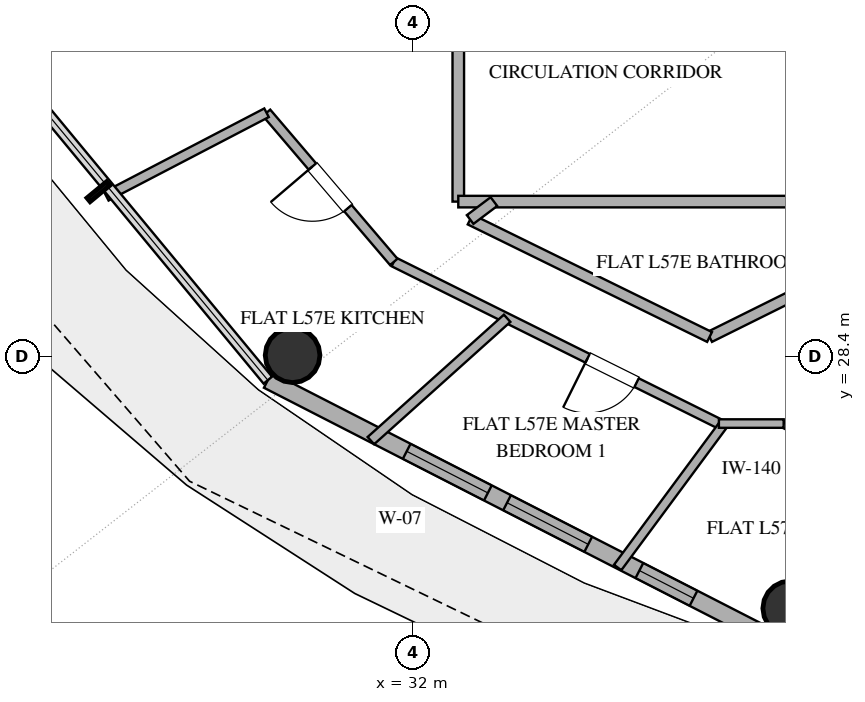
"""IFC4 building model, lengths in metres.
Left out: names, types, materials, properties, quantities, classifications, styles, units other than length and angle.
Written with IfcOpenShell. Run it as: python <this file> out.ifc"""

import sys

from ifc_helpers import new_model, si_unit, direction, frame, frame_2d, origin, origin_2d, place, context, subcontext, project, spatial, rectangle, hollow_circle, extrude, element, fill, save


model = new_model("IFC4")
c1 = context("Model", 3, precision=1e-05, world=origin(), true_north=direction((0.0, 1.0)))
c2 = subcontext(c1, "Body", "Model", "MODEL_VIEW")
j1 = project(units=[si_unit("LENGTHUNIT", "METRE"), si_unit("PLANEANGLEUNIT", "RADIAN")], contexts=[c1])
p1 = place(None, origin())
s1 = spatial("IfcSite", under=j1, at=p1, CompositionType="ELEMENT")
p2 = place(p1, origin())
s2 = spatial("IfcBuilding", under=s1, at=p2, CompositionType="ELEMENT")
p3 = place(p2, frame((0.0, 0.0, 224.4)))
s3 = spatial("IfcBuildingStorey", under=s2, at=p3, CompositionType="ELEMENT", Elevation=224.4)
for number, where, z_axis, x_axis in (
    (1, (30.025, 28.424, 0.0), (0.0, 0.0, 1.0), (1.0, 0.0, 0.0)),
    (2, (38.209, 24.261, 0.0), (0.0, 0.0, 1.0), (1.0, 0.0, 0.0)),
):
    element("IfcColumn", number, at=place(p3, frame(where, z_axis=z_axis, x_axis=x_axis)), inside=s3, PredefinedType="COLUMN", context=c2, shape_type="SweptSolid", body=[
        extrude(hollow_circle(Radius=0.45, WallThickness=0.025, at=origin_2d()), origin(), (0.0, 0.0, 1.0), 3.36),
    ])
p4 = place(p3, frame((29.617, 28.013, 0.0), z_axis=(0.0, 0.0, 1.0), x_axis=(0.890007394051, -0.455946091699, 0.0)))
e3 = element("IfcWall", 3, at=p4, inside=s3, PredefinedType="SOLIDWALL", context=c2, shape_type="SweptSolid", body=[
    extrude(rectangle(XDim=9.404, YDim=0.28, at=frame_2d((4.702, 0.0))), origin(), (0.0, 0.0, 1.0), 3.36),
])
p5 = place(p4, frame((2.566, 0.0, 0.85)))
e4 = element("IfcOpeningElement", 4, at=p5, cuts=e3, PredefinedType="OPENING", context=c2, shape_type="SweptSolid", body=[
    extrude(rectangle(XDim=1.5, YDim=1.8, at=frame_2d((0.75, 0.9))), frame((0.0, 0.15, 0.0), z_axis=(0.0, -1.0, 0.0), x_axis=(1.0, 0.0, 0.0)), (0.0, 0.0, 1.0), 0.3),
])
p6 = place(p4, frame((4.421, 0.0, 0.85)))
e5 = element("IfcOpeningElement", 5, at=p6, cuts=e3, PredefinedType="OPENING", context=c2, shape_type="SweptSolid", body=[
    extrude(rectangle(XDim=1.5, YDim=1.8, at=frame_2d((0.75, 0.9))), frame((0.0, 0.15, 0.0), z_axis=(0.0, -1.0, 0.0), x_axis=(1.0, 0.0, 0.0)), (0.0, 0.0, 1.0), 0.3),
])
p7 = place(p4, frame((6.866, 0.0, 0.85)))
e6 = element("IfcOpeningElement", 6, at=p7, cuts=e3, PredefinedType="OPENING", context=c2, shape_type="SweptSolid", body=[
    extrude(rectangle(XDim=1.0, YDim=1.8, at=frame_2d((0.5, 0.9))), frame((0.0, 0.15, 0.0), z_axis=(0.0, -1.0, 0.0), x_axis=(1.0, 0.0, 0.0)), (0.0, 0.0, 1.0), 0.3),
])
p8 = place(p3, frame((32.75, 30.95, 0.0), z_axis=(0.0, 0.0, 1.0), x_axis=(0.0, 1.0, 0.0)))
e7 = element("IfcWall", 7, at=p8, inside=s3, PredefinedType="PARTITIONING", context=c2, shape_type="SweptSolid", body=[
    extrude(rectangle(XDim=12.471, YDim=0.19, at=frame_2d((6.236, 0.0))), origin(), (0.0, 0.0, 1.0), 2.72),
])
p9 = place(p8, frame((4.508, 0.0, 0.0)))
e8 = element("IfcOpeningElement", 8, at=p9, cuts=e7, PredefinedType="OPENING", context=c2, shape_type="SweptSolid", body=[
    extrude(rectangle(XDim=1.0, YDim=2.2, at=frame_2d((0.5, 1.1))), frame((0.0, 0.105, 0.0), z_axis=(0.0, -1.0, 0.0), x_axis=(1.0, 0.0, 0.0)), (0.0, 0.0, 1.0), 0.21),
])
p10 = place(p3, frame((45.87, 30.95, 0.0), z_axis=(0.0, 0.0, 1.0), x_axis=(-1.0, 0.0, 0.0)))
e9 = element("IfcWall", 9, at=p10, inside=s3, PredefinedType="PARTITIONING", context=c2, shape_type="SweptSolid", body=[
    extrude(rectangle(XDim=13.12, YDim=0.19, at=frame_2d((6.56, 0.0))), origin(), (0.0, 0.0, 1.0), 2.72),
])
p11 = place(p3, frame((41.366, 30.95, 0.0), z_axis=(0.0, 0.0, 1.0), x_axis=(-0.895701232799, -0.444656385946, 0.0)))
e10 = element("IfcWall", 10, at=p11, inside=s3, PredefinedType="PLUMBINGWALL", context=c2, shape_type="SweptSolid", body=[
    extrude(rectangle(XDim=5.006, YDim=0.18, at=frame_2d((2.503, 0.0))), origin(), (0.0, 0.0, 1.0), 2.72),
])
p12 = place(p11, frame((2.078, 0.0, 0.0)))
e11 = element("IfcOpeningElement", 11, at=p12, cuts=e10, PredefinedType="OPENING", context=c2, shape_type="SweptSolid", body=[
    extrude(rectangle(XDim=0.85, YDim=2.1, at=frame_2d((0.425, 1.05))), frame((0.0, 0.1, 0.0), z_axis=(0.0, -1.0, 0.0), x_axis=(1.0, 0.0, 0.0)), (0.0, 0.0, 1.0), 0.2),
])
p13 = place(p3, frame((36.882, 28.724, 0.0), z_axis=(0.0, 0.0, 1.0), x_axis=(-0.897797301304, 0.440408907461, 0.0)))
e12 = element("IfcWall", 12, at=p13, inside=s3, PredefinedType="PLUMBINGWALL", context=c2, shape_type="SweptSolid", body=[
    extrude(rectangle(XDim=4.385, YDim=0.18, at=frame_2d((2.193, 0.0))), origin(), (0.0, 0.0, 1.0), 2.72),
])
p14 = place(p3, frame((37.036, 27.3, 0.0), z_axis=(0.0, 0.0, 1.0), x_axis=(-0.895471406875, 0.445119039661, 0.0)))
e13 = element("IfcWall", 13, at=p14, inside=s3, PredefinedType="PLUMBINGWALL", context=c2, shape_type="SweptSolid", body=[
    extrude(rectangle(XDim=5.971, YDim=0.16, at=frame_2d((2.986, 0.0))), origin(), (0.0, 0.0, 1.0), 2.72),
])
p15 = place(p14, frame((1.512, 0.0, 0.0)))
e14 = element("IfcOpeningElement", 14, at=p15, cuts=e13, PredefinedType="OPENING", context=c2, shape_type="SweptSolid", body=[
    extrude(rectangle(XDim=0.9, YDim=2.1, at=frame_2d((0.45, 1.05))), frame((0.0, 0.09, 0.0), z_axis=(0.0, -1.0, 0.0), x_axis=(1.0, 0.0, 0.0)), (0.0, 0.0, 1.0), 0.18),
])
p16 = place(p3, frame((31.689, 29.958, 0.0), z_axis=(0.0, 0.0, 1.0), x_axis=(-0.649012353166, 0.760777868657, 0.0)))
e15 = element("IfcWall", 15, at=p16, inside=s3, PredefinedType="PLUMBINGWALL", context=c2, shape_type="SweptSolid", body=[
    extrude(rectangle(XDim=3.224, YDim=0.16, at=frame_2d((1.612, 0.0))), origin(), (0.0, 0.0, 1.0), 2.72),
])
p17 = place(p16, frame((1.162, 0.0, 0.0)))
e16 = element("IfcOpeningElement", 16, at=p17, cuts=e15, PredefinedType="OPENING", context=c2, shape_type="SweptSolid", body=[
    extrude(rectangle(XDim=0.9, YDim=2.1, at=frame_2d((0.45, 1.05))), frame((0.0, 0.09, 0.0), z_axis=(0.0, -1.0, 0.0), x_axis=(1.0, 0.0, 0.0)), (0.0, 0.0, 1.0), 0.18),
])
p18 = place(p3, frame((31.312, 27.019, 0.0), z_axis=(0.0, 0.0, 1.0), x_axis=(0.744144111532, 0.668019117445, 0.0)))
e17 = element("IfcWall", 17, at=p18, inside=s3, PredefinedType="PLUMBINGWALL", context=c2, shape_type="SweptSolid", body=[
    extrude(rectangle(XDim=3.011, YDim=0.16, at=frame_2d((1.506, 0.0))), origin(), (0.0, 0.0, 1.0), 2.72),
])
p19 = place(p3, frame((29.596, 32.411, 0.0), z_axis=(0.0, 0.0, 1.0), x_axis=(-0.886874801181, -0.462009834344, 0.0)))
e18 = element("IfcWall", 18, at=p19, inside=s3, PredefinedType="PLUMBINGWALL", context=c2, shape_type="SweptSolid", body=[
    extrude(rectangle(XDim=2.971, YDim=0.16, at=frame_2d((1.485, 0.0))), origin(), (0.0, 0.0, 1.0), 2.72),
])
p20 = place(p3, frame((35.371, 24.933, 0.0), z_axis=(0.0, 0.0, 1.0), x_axis=(0.594787288624, 0.803883126637, 0.0)))
e19 = element("IfcWall", 19, at=p20, inside=s3, PredefinedType="PARTITIONING", context=c2, shape_type="SweptSolid", body=[
    extrude(rectangle(XDim=2.945, YDim=0.15, at=frame_2d((1.472, 0.0))), origin(), (0.0, 0.0, 1.0), 2.72),
])
p21 = place(p3, frame((39.345, 26.682, 0.0), z_axis=(0.0, 0.0, 1.0), x_axis=(-0.895584310315, 0.444891833053, 0.0)))
e20 = element("IfcWall", 20, at=p21, inside=s3, PredefinedType="PARTITIONING", context=c2, shape_type="SweptSolid", body=[
    extrude(rectangle(XDim=1.389, YDim=0.14, at=frame_2d((0.694, 0.0))), origin(), (0.0, 0.0, 1.0), 2.72),
])
p22 = place(p3, frame((38.101, 27.3, 0.0), z_axis=(0.0, 0.0, 1.0), x_axis=(-1.0, 0.0, 0.0)))
e21 = element("IfcWall", 21, at=p22, inside=s3, PredefinedType="PARTITIONING", context=c2, shape_type="SweptSolid", body=[
    extrude(rectangle(XDim=1.065, YDim=0.14, at=frame_2d((0.533, 0.0))), origin(), (0.0, 0.0, 1.0), 2.72),
])
p23 = place(p3, frame((32.945, 30.655, 0.0), z_axis=(0.0, 0.0, 1.0), x_axis=(0.798681895285, 0.601753462927, 0.0)))
e22 = element("IfcWall", 22, at=p23, inside=s3, PredefinedType="PLUMBINGWALL", context=c2, shape_type="SweptSolid", body=[
    extrude(rectangle(XDim=0.49, YDim=0.18, at=frame_2d((0.245, 0.0))), origin(), (0.0, 0.0, 1.0), 2.72),
])
p24 = place(p5, origin())
e23 = element("IfcWindow", 23, at=p24, inside=s3, PartitioningType="SINGLE_PANEL", PredefinedType="WINDOW", context=c2, shape_type="SweptSolid", body=[
    extrude(rectangle(XDim=1.5, YDim=1.8, at=frame_2d((0.75, 0.9))), frame((0.0, 0.03, 0.0), z_axis=(0.0, -1.0, 0.0), x_axis=(1.0, 0.0, 0.0)), (0.0, 0.0, 1.0), 0.06),
])
fill(e4, e23)
p25 = place(p6, origin())
e24 = element("IfcWindow", 24, at=p25, inside=s3, PartitioningType="SINGLE_PANEL", PredefinedType="WINDOW", context=c2, shape_type="SweptSolid", body=[
    extrude(rectangle(XDim=1.5, YDim=1.8, at=frame_2d((0.75, 0.9))), frame((0.0, 0.03, 0.0), z_axis=(0.0, -1.0, 0.0), x_axis=(1.0, 0.0, 0.0)), (0.0, 0.0, 1.0), 0.06),
])
fill(e5, e24)
p26 = place(p7, origin())
e25 = element("IfcWindow", 25, at=p26, inside=s3, PartitioningType="SINGLE_PANEL", PredefinedType="WINDOW", context=c2, shape_type="SweptSolid", body=[
    extrude(rectangle(XDim=1.0, YDim=1.8, at=frame_2d((0.5, 0.9))), frame((0.0, 0.03, 0.0), z_axis=(0.0, -1.0, 0.0), x_axis=(1.0, 0.0, 0.0)), (0.0, 0.0, 1.0), 0.06),
])
fill(e6, e25)
p27 = place(p15, origin())
e26 = element("IfcDoor", 26, at=p27, inside=s3, OperationType="SINGLE_SWING_RIGHT", PredefinedType="DOOR", context=c2, shape_type="SweptSolid", body=[
    extrude(rectangle(XDim=0.9, YDim=2.1, at=frame_2d((0.45, 1.05))), frame((0.0, 0.025, 0.0), z_axis=(0.0, -1.0, 0.0), x_axis=(1.0, 0.0, 0.0)), (0.0, 0.0, 1.0), 0.05),
])
fill(e14, e26)
p28 = place(p17, origin())
e27 = element("IfcDoor", 27, at=p28, inside=s3, OperationType="SINGLE_SWING_RIGHT", PredefinedType="DOOR", context=c2, shape_type="SweptSolid", body=[
    extrude(rectangle(XDim=0.9, YDim=2.1, at=frame_2d((0.45, 1.05))), frame((0.0, 0.025, 0.0), z_axis=(0.0, -1.0, 0.0), x_axis=(1.0, 0.0, 0.0)), (0.0, 0.0, 1.0), 0.05),
])
fill(e16, e27)
save(model, sys.argv[1])
